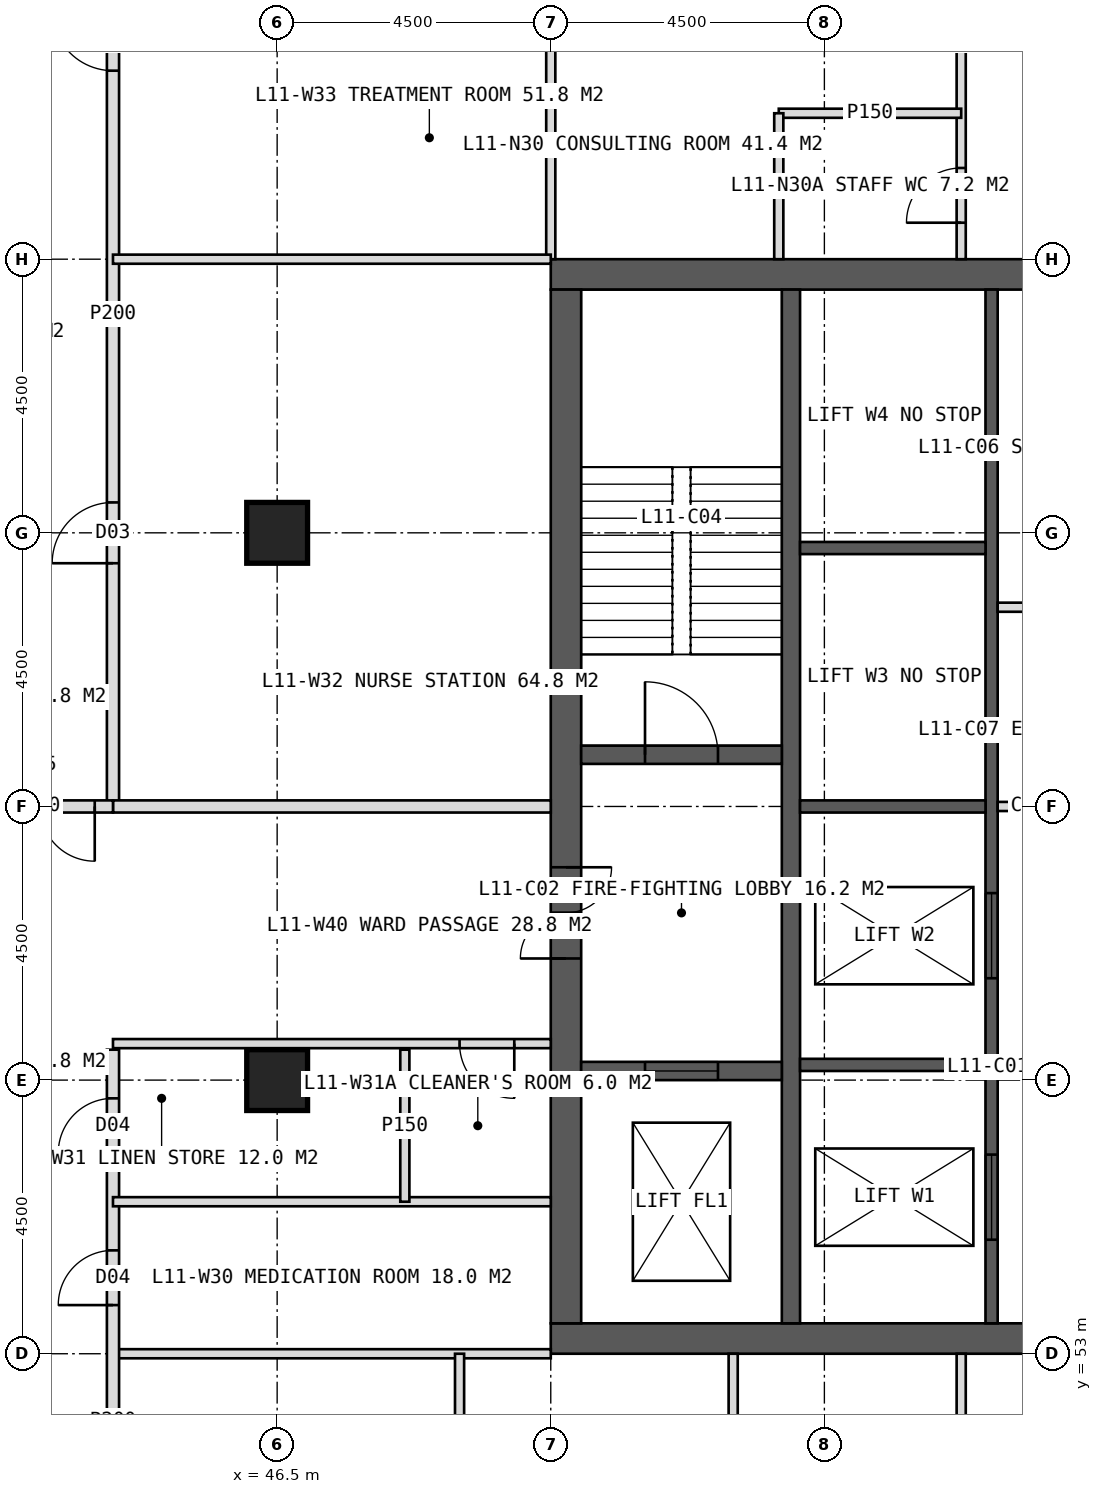
"""IFC4 building model, lengths in metres.
Left out: names, types, materials, properties, quantities, classifications, styles, units other than length and angle.
Written with IfcOpenShell. Run it as: python <this file> out.ifc"""

import sys

from ifc_helpers import new_model, si_unit, direction, frame, frame_2d, origin, origin_2d, place, context, subcontext, project, spatial, rectangle, hollow_rectangle, extrude, element, fill, save


model = new_model("IFC4")
c1 = context("Model", 3, precision=1e-05, world=origin(), true_north=direction((0.0, 1.0)))
c2 = subcontext(c1, "Body", "Model", "MODEL_VIEW")
j1 = project(units=[si_unit("LENGTHUNIT", "METRE"), si_unit("PLANEANGLEUNIT", "RADIAN")], contexts=[c1])
p1 = place(None, origin())
s1 = spatial("IfcSite", under=j1, at=p1, CompositionType="ELEMENT")
p2 = place(p1, origin())
s2 = spatial("IfcBuilding", under=s1, at=p2, CompositionType="ELEMENT")
p3 = place(p2, frame((0.0, 0.0, 51.0)))
s3 = spatial("IfcBuildingStorey", under=s2, at=p3, CompositionType="ELEMENT", Elevation=51.0)
p4 = place(p3, frame((51.0, 70.75, 0.0), z_axis=(0.0, 0.0, 1.0), x_axis=(1.0, 0.0, 0.0)))
e1 = element("IfcWall", 1, at=p4, inside=s3, PredefinedType="SHEAR", context=c2, shape_type="SweptSolid", body=[
    extrude(rectangle(XDim=18.0, YDim=0.5, at=frame_2d((9.0, 0.0))), origin(), (0.0, 0.0, 1.0), 4.0),
])
p5 = place(p4, frame((8.1, 0.0, 0.0)))
e2 = element("IfcOpeningElement", 2, at=p5, cuts=e1, PredefinedType="OPENING", context=c2, shape_type="SweptSolid", body=[
    extrude(rectangle(XDim=1.8, YDim=2.2, at=frame_2d((0.9, 1.1))), frame((0.0, 0.26, 0.0), z_axis=(0.0, -1.0, 0.0), x_axis=(1.0, 0.0, 0.0)), (0.0, 0.0, 1.0), 0.52),
])
p6 = place(p3, frame((51.0, 53.25, 0.0), z_axis=(0.0, 0.0, 1.0), x_axis=(1.0, 0.0, 0.0)))
e3 = element("IfcWall", 3, at=p6, inside=s3, PredefinedType="SHEAR", context=c2, shape_type="SweptSolid", body=[
    extrude(rectangle(XDim=18.0, YDim=0.5, at=frame_2d((9.0, 0.0))), origin(), (0.0, 0.0, 1.0), 4.0),
])
p7 = place(p6, frame((8.1, 0.0, 0.0)))
e4 = element("IfcOpeningElement", 4, at=p7, cuts=e3, PredefinedType="OPENING", context=c2, shape_type="SweptSolid", body=[
    extrude(rectangle(XDim=1.8, YDim=2.2, at=frame_2d((0.9, 1.1))), frame((0.0, 0.26, 0.0), z_axis=(0.0, -1.0, 0.0), x_axis=(1.0, 0.0, 0.0)), (0.0, 0.0, 1.0), 0.52),
])
p8 = place(p3, frame((51.25, 53.5, 0.0), z_axis=(0.0, 0.0, 1.0), x_axis=(0.0, 1.0, 0.0)))
e5 = element("IfcWall", 5, at=p8, inside=s3, PredefinedType="SHEAR", context=c2, shape_type="SweptSolid", body=[
    extrude(rectangle(XDim=17.0, YDim=0.5, at=frame_2d((8.5, 0.0))), origin(), (0.0, 0.0, 1.0), 4.0),
])
p9 = place(p8, frame((6.0, 0.0, 0.0)))
e6 = element("IfcOpeningElement", 6, at=p9, cuts=e5, PredefinedType="OPENING", context=c2, shape_type="SweptSolid", body=[
    extrude(rectangle(XDim=1.5, YDim=2.2, at=frame_2d((0.75, 1.1))), frame((0.0, 0.26, 0.0), z_axis=(0.0, -1.0, 0.0), x_axis=(1.0, 0.0, 0.0)), (0.0, 0.0, 1.0), 0.52),
])
p10 = place(p3, frame((54.95, 53.5, 0.0), z_axis=(0.0, 0.0, 1.0), x_axis=(0.0, 1.0, 0.0)))
e7 = element("IfcWall", 7, at=p10, inside=s3, PredefinedType="SHEAR", context=c2, shape_type="SweptSolid", body=[
    extrude(rectangle(XDim=17.0, YDim=0.3, at=frame_2d((8.5, 0.0))), origin(), (0.0, 0.0, 1.0), 4.0),
])
p11 = place(p3, frame((58.25, 53.5, 0.0), z_axis=(0.0, 0.0, 1.0), x_axis=(0.0, 1.0, 0.0)))
e8 = element("IfcWall", 8, at=p11, inside=s3, PredefinedType="SHEAR", context=c2, shape_type="SweptSolid", body=[
    extrude(rectangle(XDim=17.0, YDim=0.2, at=frame_2d((8.5, 0.0))), origin(), (0.0, 0.0, 1.0), 4.0),
])
p12 = place(p11, frame((1.375, 0.0, 0.0)))
e9 = element("IfcOpeningElement", 9, at=p12, cuts=e8, PredefinedType="OPENING", context=c2, shape_type="SweptSolid", body=[
    extrude(rectangle(XDim=1.4, YDim=2.2, at=frame_2d((0.7, 1.1))), frame((0.0, 0.11, 0.0), z_axis=(0.0, -1.0, 0.0), x_axis=(1.0, 0.0, 0.0)), (0.0, 0.0, 1.0), 0.22),
])
p13 = place(p11, frame((5.675, 0.0, 0.0)))
e10 = element("IfcOpeningElement", 10, at=p13, cuts=e8, PredefinedType="OPENING", context=c2, shape_type="SweptSolid", body=[
    extrude(rectangle(XDim=1.4, YDim=2.2, at=frame_2d((0.7, 1.1))), frame((0.0, 0.11, 0.0), z_axis=(0.0, -1.0, 0.0), x_axis=(1.0, 0.0, 0.0)), (0.0, 0.0, 1.0), 0.22),
])
for number, where, z_axis, x_axis in (
    (11, (55.1, 57.75, 0.0), (0.0, 0.0, 1.0), (1.0, 0.0, 0.0)),
    (12, (55.1, 62.0, 0.0), (0.0, 0.0, 1.0), (1.0, 0.0, 0.0)),
    (13, (55.1, 66.25, 0.0), (0.0, 0.0, 1.0), (1.0, 0.0, 0.0)),
):
    element("IfcWall", number, at=place(p3, frame(where, z_axis=z_axis, x_axis=x_axis)), inside=s3, PredefinedType="SHEAR", context=c2, shape_type="SweptSolid", body=[
        extrude(rectangle(XDim=3.05, YDim=0.2, at=frame_2d((1.525, 0.0))), origin(), (0.0, 0.0, 1.0), 4.0),
    ])
p14 = place(p3, frame((51.5, 62.85, 0.0), z_axis=(0.0, 0.0, 1.0), x_axis=(1.0, 0.0, 0.0)))
e14 = element("IfcWall", 14, at=p14, inside=s3, PredefinedType="SHEAR", context=c2, shape_type="SweptSolid", body=[
    extrude(rectangle(XDim=3.3, YDim=0.3, at=frame_2d((1.65, 0.0))), origin(), (0.0, 0.0, 1.0), 4.0),
])
p15 = place(p14, frame((1.05, 0.0, 0.0)))
e15 = element("IfcOpeningElement", 15, at=p15, cuts=e14, PredefinedType="OPENING", context=c2, shape_type="SweptSolid", body=[
    extrude(rectangle(XDim=1.2, YDim=2.1, at=frame_2d((0.6, 1.05))), frame((0.0, 0.16, 0.0), z_axis=(0.0, -1.0, 0.0), x_axis=(1.0, 0.0, 0.0)), (0.0, 0.0, 1.0), 0.32),
])
p16 = place(p3, frame((51.5, 57.65, 0.0), z_axis=(0.0, 0.0, 1.0), x_axis=(1.0, 0.0, 0.0)))
e16 = element("IfcWall", 16, at=p16, inside=s3, PredefinedType="SHEAR", context=c2, shape_type="SweptSolid", body=[
    extrude(rectangle(XDim=3.3, YDim=0.3, at=frame_2d((1.65, 0.0))), origin(), (0.0, 0.0, 1.0), 4.0),
])
p17 = place(p16, frame((1.05, 0.0, 0.0)))
e17 = element("IfcOpeningElement", 17, at=p17, cuts=e16, PredefinedType="OPENING", context=c2, shape_type="SweptSolid", body=[
    extrude(rectangle(XDim=1.2, YDim=2.2, at=frame_2d((0.6, 1.1))), frame((0.0, 0.16, 0.0), z_axis=(0.0, -1.0, 0.0), x_axis=(1.0, 0.0, 0.0)), (0.0, 0.0, 1.0), 0.32),
])
for number, where, z_axis, x_axis in (
    (18, (46.5, 57.5, 0.0), (0.0, 0.0, 1.0), (1.0, 0.0, 0.0)),
    (19, (46.5, 66.5, 0.0), (0.0, 0.0, 1.0), (1.0, 0.0, 0.0)),
):
    element("IfcColumn", number, at=place(p3, frame(where, z_axis=z_axis, x_axis=x_axis)), inside=s3, PredefinedType="COLUMN", context=c2, shape_type="SweptSolid", body=[
        extrude(hollow_rectangle(XDim=1.0, YDim=1.0, WallThickness=0.1, at=origin_2d()), origin(), (0.0, 0.0, 1.0), 4.0),
    ])
p18 = place(p3, frame((51.0, 71.0, 0.0), z_axis=(0.0, 0.0, 1.0), x_axis=(0.0, 1.0, 0.0)))
e20 = element("IfcWall", 20, at=p18, inside=s3, PredefinedType="PARTITIONING", context=c2, shape_type="SweptSolid", body=[
    extrude(rectangle(XDim=7.2, YDim=0.15, at=frame_2d((3.6, 0.0))), origin(), (0.0, 0.0, 1.0), 3.75),
])
p19 = place(p3, frame((57.75, 71.0, 0.0), z_axis=(0.0, 0.0, 1.0), x_axis=(0.0, 1.0, 0.0)))
e21 = element("IfcWall", 21, at=p19, inside=s3, PredefinedType="PARTITIONING", context=c2, shape_type="SweptSolid", body=[
    extrude(rectangle(XDim=7.2, YDim=0.15, at=frame_2d((3.6, 0.0))), origin(), (0.0, 0.0, 1.0), 3.75),
])
p20 = place(p19, frame((0.6, 0.0, 0.0)))
e22 = element("IfcOpeningElement", 22, at=p20, cuts=e21, PredefinedType="OPENING", context=c2, shape_type="SweptSolid", body=[
    extrude(rectangle(XDim=0.9, YDim=2.1, at=frame_2d((0.45, 1.05))), frame((0.0, 0.085, 0.0), z_axis=(0.0, -1.0, 0.0), x_axis=(1.0, 0.0, 0.0)), (0.0, 0.0, 1.0), 0.17),
])
p21 = place(p3, frame((54.75, 73.4, 0.0), z_axis=(0.0, 0.0, 1.0), x_axis=(1.0, 0.0, 0.0)))
e23 = element("IfcWall", 23, at=p21, inside=s3, PredefinedType="PARTITIONING", context=c2, shape_type="SweptSolid", body=[
    extrude(rectangle(XDim=3.0, YDim=0.15, at=frame_2d((1.5, 0.0))), origin(), (0.0, 0.0, 1.0), 3.75),
])
p22 = place(p3, frame((54.75, 71.0, 0.0), z_axis=(0.0, 0.0, 1.0), x_axis=(0.0, 1.0, 0.0)))
e24 = element("IfcWall", 24, at=p22, inside=s3, PredefinedType="PARTITIONING", context=c2, shape_type="SweptSolid", body=[
    extrude(rectangle(XDim=2.4, YDim=0.15, at=frame_2d((1.2, 0.0))), origin(), (0.0, 0.0, 1.0), 3.75),
])
p23 = place(p3, frame((51.0, 53.0, 0.0), z_axis=(0.0, 0.0, 1.0), x_axis=(-1.0, 0.0, 0.0)))
e25 = element("IfcWall", 25, at=p23, inside=s3, PredefinedType="PARTITIONING", context=c2, shape_type="SweptSolid", body=[
    extrude(rectangle(XDim=7.2, YDim=0.15, at=frame_2d((3.6, 0.0))), origin(), (0.0, 0.0, 1.0), 3.75),
])
p24 = place(p3, frame((43.8, 45.8, 0.0), z_axis=(0.0, 0.0, 1.0), x_axis=(0.0, 1.0, 0.0)))
e26 = element("IfcWall", 26, at=p24, inside=s3, PredefinedType="PARTITIONING", context=c2, shape_type="SweptSolid", body=[
    extrude(rectangle(XDim=12.2, YDim=0.2, at=frame_2d((6.1, 0.0))), origin(), (0.0, 0.0, 1.0), 3.75),
])
p25 = place(p24, frame((8.0, 0.0, 0.0)))
e27 = element("IfcOpeningElement", 27, at=p25, cuts=e26, PredefinedType="OPENING", context=c2, shape_type="SweptSolid", body=[
    extrude(rectangle(XDim=0.9, YDim=2.1, at=frame_2d((0.45, 1.05))), frame((0.0, 0.11, 0.0), z_axis=(0.0, -1.0, 0.0), x_axis=(1.0, 0.0, 0.0)), (0.0, 0.0, 1.0), 0.22),
])
p26 = place(p24, frame((10.5, 0.0, 0.0)))
e28 = element("IfcOpeningElement", 28, at=p26, cuts=e26, PredefinedType="OPENING", context=c2, shape_type="SweptSolid", body=[
    extrude(rectangle(XDim=0.9, YDim=2.1, at=frame_2d((0.45, 1.05))), frame((0.0, 0.11, 0.0), z_axis=(0.0, -1.0, 0.0), x_axis=(1.0, 0.0, 0.0)), (0.0, 0.0, 1.0), 0.22),
])
p27 = place(p3, frame((43.8, 62.0, 0.0), z_axis=(0.0, 0.0, 1.0), x_axis=(0.0, 1.0, 0.0)))
e29 = element("IfcWall", 29, at=p27, inside=s3, PredefinedType="PARTITIONING", context=c2, shape_type="SweptSolid", body=[
    extrude(rectangle(XDim=16.2, YDim=0.2, at=frame_2d((8.1, 0.0))), origin(), (0.0, 0.0, 1.0), 3.75),
])
p28 = place(p27, frame((4.0, 0.0, 0.0)))
e30 = element("IfcOpeningElement", 30, at=p28, cuts=e29, PredefinedType="OPENING", context=c2, shape_type="SweptSolid", body=[
    extrude(rectangle(XDim=1.0, YDim=2.1, at=frame_2d((0.5, 1.05))), frame((0.0, 0.11, 0.0), z_axis=(0.0, -1.0, 0.0), x_axis=(1.0, 0.0, 0.0)), (0.0, 0.0, 1.0), 0.22),
])
p29 = place(p27, frame((12.1, 0.0, 0.0)))
e31 = element("IfcOpeningElement", 31, at=p29, cuts=e29, PredefinedType="OPENING", context=c2, shape_type="SweptSolid", body=[
    extrude(rectangle(XDim=1.0, YDim=2.1, at=frame_2d((0.5, 1.05))), frame((0.0, 0.11, 0.0), z_axis=(0.0, -1.0, 0.0), x_axis=(1.0, 0.0, 0.0)), (0.0, 0.0, 1.0), 0.22),
])
p30 = place(p3, frame((51.0, 58.1, 0.0), z_axis=(0.0, 0.0, 1.0), x_axis=(-1.0, 0.0, 0.0)))
e32 = element("IfcWall", 32, at=p30, inside=s3, PredefinedType="PARTITIONING", context=c2, shape_type="SweptSolid", body=[
    extrude(rectangle(XDim=7.2, YDim=0.15, at=frame_2d((3.6, 0.0))), origin(), (0.0, 0.0, 1.0), 3.75),
])
p31 = place(p30, frame((0.6, 0.0, 0.0)))
e33 = element("IfcOpeningElement", 33, at=p31, cuts=e32, PredefinedType="OPENING", context=c2, shape_type="SweptSolid", body=[
    extrude(rectangle(XDim=0.9, YDim=2.1, at=frame_2d((0.45, 1.05))), frame((0.0, 0.085, 0.0), z_axis=(0.0, -1.0, 0.0), x_axis=(1.0, 0.0, 0.0)), (0.0, 0.0, 1.0), 0.17),
])
p32 = place(p3, frame((51.0, 62.0, 0.0), z_axis=(0.0, 0.0, 1.0), x_axis=(-1.0, 0.0, 0.0)))
e34 = element("IfcWall", 34, at=p32, inside=s3, PredefinedType="SOLIDWALL", context=c2, shape_type="SweptSolid", body=[
    extrude(rectangle(XDim=7.2, YDim=0.2, at=frame_2d((3.6, 0.0))), origin(), (0.0, 0.0, 1.0), 2.75),
])
for number, where, z_axis, x_axis in (
    (35, (51.0, 55.5, 0.0), (0.0, 0.0, 1.0), (-1.0, 0.0, 0.0)),
    (36, (51.0, 71.0, 0.0), (0.0, 0.0, 1.0), (-1.0, 0.0, 0.0)),
):
    element("IfcWall", number, at=place(p3, frame(where, z_axis=z_axis, x_axis=x_axis)), inside=s3, PredefinedType="PARTITIONING", context=c2, shape_type="SweptSolid", body=[
        extrude(rectangle(XDim=7.2, YDim=0.15, at=frame_2d((3.6, 0.0))), origin(), (0.0, 0.0, 1.0), 3.75),
    ])
p33 = place(p3, frame((48.6, 55.5, 0.0), z_axis=(0.0, 0.0, 1.0), x_axis=(0.0, 1.0, 0.0)))
e37 = element("IfcWall", 37, at=p33, inside=s3, PredefinedType="PARTITIONING", context=c2, shape_type="SweptSolid", body=[
    extrude(rectangle(XDim=2.5, YDim=0.15, at=frame_2d((1.25, 0.0))), origin(), (0.0, 0.0, 1.0), 3.75),
])
for number, where, z_axis, x_axis in (
    (38, (57.75, 53.0, 0.0), (0.0, 0.0, 1.0), (0.0, -1.0, 0.0)),
    (39, (54.0, 53.0, 0.0), (0.0, 0.0, 1.0), (0.0, -1.0, 0.0)),
    (40, (49.5, 53.0, 0.0), (0.0, 0.0, 1.0), (0.0, -1.0, 0.0)),
):
    element("IfcWall", number, at=place(p3, frame(where, z_axis=z_axis, x_axis=x_axis)), inside=s3, PredefinedType="PARTITIONING", context=c2, shape_type="SweptSolid", body=[
        extrude(rectangle(XDim=7.2, YDim=0.15, at=frame_2d((3.6, 0.0))), origin(), (0.0, 0.0, 1.0), 3.75),
    ])
p34 = place(p3, frame((43.8, 62.0, 0.0), z_axis=(0.0, 0.0, 1.0), x_axis=(-1.0, 0.0, 0.0)))
e41 = element("IfcWall", 41, at=p34, inside=s3, PredefinedType="SOLIDWALL", context=c2, shape_type="SweptSolid", body=[
    extrude(rectangle(XDim=2.7, YDim=0.2, at=frame_2d((1.35, 0.0))), origin(), (0.0, 0.0, 1.0), 2.75),
])
p35 = place(p34, frame((0.3, 0.0, 0.0)))
e42 = element("IfcOpeningElement", 42, at=p35, cuts=e41, PredefinedType="OPENING", context=c2, shape_type="SweptSolid", body=[
    extrude(rectangle(XDim=1.8, YDim=2.2, at=frame_2d((0.9, 1.1))), frame((0.0, 0.11, 0.0), z_axis=(0.0, -1.0, 0.0), x_axis=(1.0, 0.0, 0.0)), (0.0, 0.0, 1.0), 0.22),
])
p36 = place(p3, frame((58.35, 62.0, 0.0), z_axis=(0.0, 0.0, 1.0), x_axis=(1.0, 0.0, 0.0)))
e43 = element("IfcWall", 43, at=p36, inside=s3, PredefinedType="PARTITIONING", context=c2, shape_type="SweptSolid", body=[
    extrude(rectangle(XDim=3.3, YDim=0.15, at=frame_2d((1.65, 0.0))), origin(), (0.0, 0.0, 1.0), 3.75),
])
p37 = place(p36, frame((1.15, 0.0, 0.0)))
e44 = element("IfcOpeningElement", 44, at=p37, cuts=e43, PredefinedType="OPENING", context=c2, shape_type="SweptSolid", body=[
    extrude(rectangle(XDim=1.0, YDim=2.1, at=frame_2d((0.5, 1.05))), frame((0.0, 0.085, 0.0), z_axis=(0.0, -1.0, 0.0), x_axis=(1.0, 0.0, 0.0)), (0.0, 0.0, 1.0), 0.17),
])
p38 = place(p3, frame((58.35, 65.277, 0.0), z_axis=(0.0, 0.0, 1.0), x_axis=(1.0, 0.0, 0.0)))
e45 = element("IfcWall", 45, at=p38, inside=s3, PredefinedType="PARTITIONING", context=c2, shape_type="SweptSolid", body=[
    extrude(rectangle(XDim=3.3, YDim=0.15, at=frame_2d((1.65, 0.0))), origin(), (0.0, 0.0, 1.0), 3.75),
])
p39 = place(p20, origin())
e46 = element("IfcDoor", 46, at=p39, inside=s3, OperationType="SINGLE_SWING_LEFT", PredefinedType="DOOR", context=c2, shape_type="SweptSolid", body=[
    extrude(rectangle(XDim=0.9, YDim=2.1, at=frame_2d((0.45, 1.05))), frame((0.0, 0.025, 0.0), z_axis=(0.0, -1.0, 0.0), x_axis=(1.0, 0.0, 0.0)), (0.0, 0.0, 1.0), 0.05),
])
fill(e22, e46)
p40 = place(p25, origin())
e47 = element("IfcDoor", 47, at=p40, inside=s3, OperationType="SINGLE_SWING_LEFT", PredefinedType="DOOR", context=c2, shape_type="SweptSolid", body=[
    extrude(rectangle(XDim=0.9, YDim=2.1, at=frame_2d((0.45, 1.05))), frame((0.0, 0.025, 0.0), z_axis=(0.0, -1.0, 0.0), x_axis=(1.0, 0.0, 0.0)), (0.0, 0.0, 1.0), 0.05),
])
fill(e27, e47)
p41 = place(p31, origin())
e48 = element("IfcDoor", 48, at=p41, inside=s3, OperationType="SINGLE_SWING_LEFT", PredefinedType="DOOR", context=c2, shape_type="SweptSolid", body=[
    extrude(rectangle(XDim=0.9, YDim=2.1, at=frame_2d((0.45, 1.05))), frame((0.0, 0.025, 0.0), z_axis=(0.0, -1.0, 0.0), x_axis=(1.0, 0.0, 0.0)), (0.0, 0.0, 1.0), 0.05),
])
fill(e33, e48)
p42 = place(p26, origin())
e49 = element("IfcDoor", 49, at=p42, inside=s3, OperationType="SINGLE_SWING_LEFT", PredefinedType="DOOR", context=c2, shape_type="SweptSolid", body=[
    extrude(rectangle(XDim=0.9, YDim=2.1, at=frame_2d((0.45, 1.05))), frame((0.0, 0.025, 0.0), z_axis=(0.0, -1.0, 0.0), x_axis=(1.0, 0.0, 0.0)), (0.0, 0.0, 1.0), 0.05),
])
fill(e28, e49)
p43 = place(p28, origin())
e50 = element("IfcDoor", 50, at=p43, inside=s3, OperationType="SINGLE_SWING_LEFT", PredefinedType="DOOR", context=c2, shape_type="SweptSolid", body=[
    extrude(rectangle(XDim=1.0, YDim=2.1, at=frame_2d((0.5, 1.05))), frame((0.0, 0.025, 0.0), z_axis=(0.0, -1.0, 0.0), x_axis=(1.0, 0.0, 0.0)), (0.0, 0.0, 1.0), 0.05),
])
fill(e30, e50)
p44 = place(p29, origin())
e51 = element("IfcDoor", 51, at=p44, inside=s3, OperationType="SINGLE_SWING_RIGHT", PredefinedType="DOOR", context=c2, shape_type="SweptSolid", body=[
    extrude(rectangle(XDim=1.0, YDim=2.1, at=frame_2d((0.5, 1.05))), frame((0.0, 0.025, 0.0), z_axis=(0.0, -1.0, 0.0), x_axis=(1.0, 0.0, 0.0)), (0.0, 0.0, 1.0), 0.05),
])
fill(e31, e51)
p45 = place(p35, origin())
e52 = element("IfcDoor", 52, at=p45, inside=s3, OperationType="DOUBLE_DOOR_DOUBLE_SWING", PredefinedType="DOOR", context=c2, shape_type="SweptSolid", body=[
    extrude(rectangle(XDim=1.8, YDim=2.2, at=frame_2d((0.9, 1.1))), frame((0.0, 0.025, 0.0), z_axis=(0.0, -1.0, 0.0), x_axis=(1.0, 0.0, 0.0)), (0.0, 0.0, 1.0), 0.05),
])
fill(e42, e52)
p46 = place(p9, origin())
e53 = element("IfcDoor", 53, at=p46, inside=s3, OperationType="DOUBLE_DOOR_SINGLE_SWING", PredefinedType="DOOR", context=c2, shape_type="SweptSolid", body=[
    extrude(rectangle(XDim=1.5, YDim=2.2, at=frame_2d((0.75, 1.1))), frame((0.0, 0.025, 0.0), z_axis=(0.0, -1.0, 0.0), x_axis=(1.0, 0.0, 0.0)), (0.0, 0.0, 1.0), 0.05),
])
fill(e6, e53)
p47 = place(p15, origin())
e54 = element("IfcDoor", 54, at=p47, inside=s3, OperationType="SINGLE_SWING_LEFT", PredefinedType="DOOR", context=c2, shape_type="SweptSolid", body=[
    extrude(rectangle(XDim=1.2, YDim=2.1, at=frame_2d((0.6, 1.05))), frame((0.0, 0.025, 0.0), z_axis=(0.0, -1.0, 0.0), x_axis=(1.0, 0.0, 0.0)), (0.0, 0.0, 1.0), 0.05),
])
fill(e15, e54)
p48 = place(p17, origin())
e55 = element("IfcDoor", 55, at=p48, inside=s3, OperationType="SLIDING_TO_LEFT", PredefinedType="DOOR", context=c2, shape_type="SweptSolid", body=[
    extrude(rectangle(XDim=1.2, YDim=2.2, at=frame_2d((0.6, 1.1))), frame((0.0, 0.025, 0.0), z_axis=(0.0, -1.0, 0.0), x_axis=(1.0, 0.0, 0.0)), (0.0, 0.0, 1.0), 0.05),
])
fill(e17, e55)
p49 = place(p12, origin())
e56 = element("IfcDoor", 56, at=p49, inside=s3, OperationType="SLIDING_TO_LEFT", PredefinedType="DOOR", context=c2, shape_type="SweptSolid", body=[
    extrude(rectangle(XDim=1.4, YDim=2.2, at=frame_2d((0.7, 1.1))), frame((0.0, 0.025, 0.0), z_axis=(0.0, -1.0, 0.0), x_axis=(1.0, 0.0, 0.0)), (0.0, 0.0, 1.0), 0.05),
])
fill(e9, e56)
p50 = place(p13, origin())
e57 = element("IfcDoor", 57, at=p50, inside=s3, OperationType="SLIDING_TO_LEFT", PredefinedType="DOOR", context=c2, shape_type="SweptSolid", body=[
    extrude(rectangle(XDim=1.4, YDim=2.2, at=frame_2d((0.7, 1.1))), frame((0.0, 0.025, 0.0), z_axis=(0.0, -1.0, 0.0), x_axis=(1.0, 0.0, 0.0)), (0.0, 0.0, 1.0), 0.05),
])
fill(e10, e57)
save(model, sys.argv[1])
